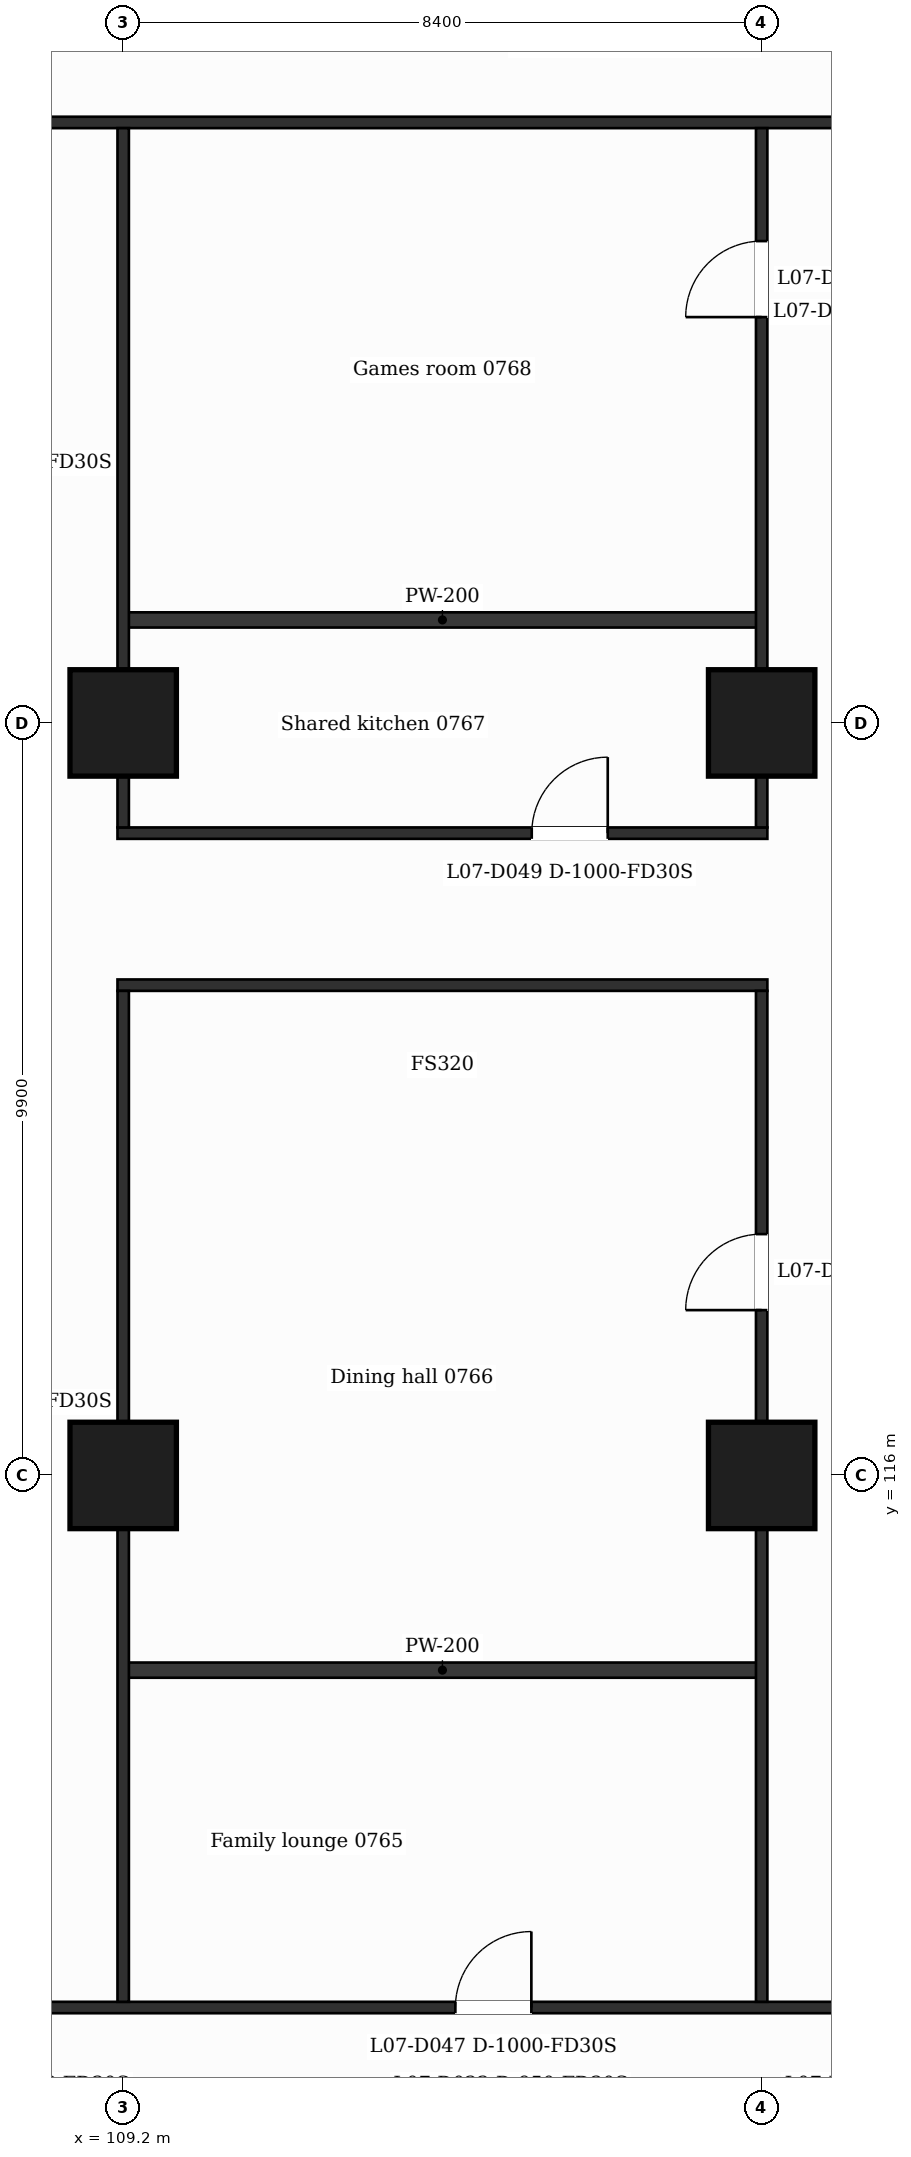
"""IFC4 building model, lengths in metres.
Left out: names, types, materials, properties, quantities, classifications, styles, units other than length and angle.
Written with IfcOpenShell. Run it as: python <this file> out.ifc"""

import sys

from ifc_helpers import new_model, si_unit, direction, frame, frame_2d, origin, origin_2d, place, context, subcontext, project, spatial, rectangle, extrude, element, fill, save


model = new_model("IFC4")
c1 = context("Model", 3, precision=1e-05, world=origin(), true_north=direction((0.0, 1.0)))
c2 = subcontext(c1, "Body", "Model", "MODEL_VIEW")
j1 = project(units=[si_unit("LENGTHUNIT", "METRE"), si_unit("PLANEANGLEUNIT", "RADIAN")], contexts=[c1])
p1 = place(None, origin())
s1 = spatial("IfcSite", under=j1, at=p1, CompositionType="ELEMENT")
p2 = place(p1, origin())
s2 = spatial("IfcBuilding", under=s1, at=p2, CompositionType="ELEMENT")
p3 = place(p2, frame((0.0, 0.0, 42.5)))
s3 = spatial("IfcBuildingStorey", under=s2, at=p3, CompositionType="ELEMENT", Elevation=42.5)
for number, where, z_axis, x_axis in (
    (1, (109.2, 116.0, 0.0), (0.0, 0.0, 1.0), (1.0, 0.0, 0.0)),
    (2, (117.6, 116.0, 0.0), (0.0, 0.0, 1.0), (1.0, 0.0, 0.0)),
    (3, (109.2, 125.9, 0.0), (0.0, 0.0, 1.0), (1.0, 0.0, 0.0)),
    (4, (117.6, 125.9, 0.0), (0.0, 0.0, 1.0), (1.0, 0.0, 0.0)),
):
    element("IfcColumn", number, at=place(p3, frame(where, z_axis=z_axis, x_axis=x_axis)), inside=s3, PredefinedType="COLUMN", context=c2, shape_type="SweptSolid", body=[
        extrude(rectangle(XDim=1.4, YDim=1.4, at=origin_2d()), origin(), (0.0, 0.0, 1.0), 3.5),
    ])
p4 = place(p3, frame((100.725, 109.0, 0.0), z_axis=(0.0, 0.0, 1.0), x_axis=(1.0, 0.0, 0.0)))
e5 = element("IfcWall", 5, at=p4, inside=s3, PredefinedType="PARTITIONING", context=c2, shape_type="SweptSolid", body=[
    extrude(rectangle(XDim=25.35, YDim=0.15, at=frame_2d((12.675, 0.0))), origin(), (0.0, 0.0, 1.0), 3.18),
])
p5 = place(p4, frame((1.2, 0.0, 0.0)))
e6 = element("IfcOpeningElement", 6, at=p5, cuts=e5, PredefinedType="OPENING", context=c2, shape_type="SweptSolid", body=[
    extrude(rectangle(XDim=1.0, YDim=2.1, at=frame_2d((0.5, 1.05))), frame((0.0, 0.085, 0.0), z_axis=(0.0, -1.0, 0.0), x_axis=(1.0, 0.0, 0.0)), (0.0, 0.0, 1.0), 0.17),
])
p6 = place(p4, frame((12.845, 0.0, 0.0)))
e7 = element("IfcOpeningElement", 7, at=p6, cuts=e5, PredefinedType="OPENING", context=c2, shape_type="SweptSolid", body=[
    extrude(rectangle(XDim=1.0, YDim=2.1, at=frame_2d((0.5, 1.05))), frame((0.0, 0.085, 0.0), z_axis=(0.0, -1.0, 0.0), x_axis=(1.0, 0.0, 0.0)), (0.0, 0.0, 1.0), 0.17),
])
p7 = place(p4, frame((23.15, 0.0, 0.0)))
e8 = element("IfcOpeningElement", 8, at=p7, cuts=e5, PredefinedType="OPENING", context=c2, shape_type="SweptSolid", body=[
    extrude(rectangle(XDim=1.0, YDim=2.1, at=frame_2d((0.5, 1.05))), frame((0.0, 0.085, 0.0), z_axis=(0.0, -1.0, 0.0), x_axis=(1.0, 0.0, 0.0)), (0.0, 0.0, 1.0), 0.17),
])
p8 = place(p3, frame((109.2, 113.438, 0.0), z_axis=(0.0, 0.0, 1.0), x_axis=(1.0, 0.0, 0.0)))
e9 = element("IfcWall", 9, at=p8, inside=s3, PredefinedType="PARTITIONING", context=c2, shape_type="SweptSolid", body=[
    extrude(rectangle(XDim=8.4, YDim=0.2, at=frame_2d((4.2, 0.0))), origin(), (0.0, 0.0, 1.0), 3.18),
])
p9 = place(p3, frame((109.125, 122.45, 0.0), z_axis=(0.0, 0.0, 1.0), x_axis=(1.0, 0.0, 0.0)))
e10 = element("IfcWall", 10, at=p9, inside=s3, PredefinedType="PARTITIONING", context=c2, shape_type="SweptSolid", body=[
    extrude(rectangle(XDim=8.55, YDim=0.15, at=frame_2d((4.275, 0.0))), origin(), (0.0, 0.0, 1.0), 3.18),
])
p10 = place(p3, frame((109.125, 124.45, 0.0), z_axis=(0.0, 0.0, 1.0), x_axis=(1.0, 0.0, 0.0)))
e11 = element("IfcWall", 11, at=p10, inside=s3, PredefinedType="PARTITIONING", context=c2, shape_type="SweptSolid", body=[
    extrude(rectangle(XDim=8.55, YDim=0.15, at=frame_2d((4.275, 0.0))), origin(), (0.0, 0.0, 1.0), 3.18),
])
p11 = place(p10, frame((5.45, 0.0, 0.0)))
e12 = element("IfcOpeningElement", 12, at=p11, cuts=e11, PredefinedType="OPENING", context=c2, shape_type="SweptSolid", body=[
    extrude(rectangle(XDim=1.0, YDim=2.1, at=frame_2d((0.5, 1.05))), frame((0.0, 0.085, 0.0), z_axis=(0.0, -1.0, 0.0), x_axis=(1.0, 0.0, 0.0)), (0.0, 0.0, 1.0), 0.17),
])
p12 = place(p3, frame((109.2, 127.255, 0.0), z_axis=(0.0, 0.0, 1.0), x_axis=(1.0, 0.0, 0.0)))
e13 = element("IfcWall", 13, at=p12, inside=s3, PredefinedType="PARTITIONING", context=c2, shape_type="SweptSolid", body=[
    extrude(rectangle(XDim=8.4, YDim=0.2, at=frame_2d((4.2, 0.0))), origin(), (0.0, 0.0, 1.0), 3.18),
])
p13 = place(p3, frame((100.725, 133.8, 0.0), z_axis=(0.0, 0.0, 1.0), x_axis=(1.0, 0.0, 0.0)))
e14 = element("IfcWall", 14, at=p13, inside=s3, PredefinedType="PARTITIONING", context=c2, shape_type="SweptSolid", body=[
    extrude(rectangle(XDim=25.35, YDim=0.15, at=frame_2d((12.675, 0.0))), origin(), (0.0, 0.0, 1.0), 3.18),
])
p14 = place(p3, frame((109.2, 109.075, 0.0), z_axis=(0.0, 0.0, 1.0), x_axis=(0.0, 1.0, 0.0)))
e15 = element("IfcWall", 15, at=p14, inside=s3, PredefinedType="PARTITIONING", context=c2, shape_type="SweptSolid", body=[
    extrude(rectangle(XDim=13.3, YDim=0.15, at=frame_2d((6.65, 0.0))), origin(), (0.0, 0.0, 1.0), 3.18),
])
p15 = place(p3, frame((109.2, 124.525, 0.0), z_axis=(0.0, 0.0, 1.0), x_axis=(0.0, 1.0, 0.0)))
e16 = element("IfcWall", 16, at=p15, inside=s3, PredefinedType="PARTITIONING", context=c2, shape_type="SweptSolid", body=[
    extrude(rectangle(XDim=9.2, YDim=0.15, at=frame_2d((4.6, 0.0))), origin(), (0.0, 0.0, 1.0), 3.18),
])
p16 = place(p3, frame((117.6, 109.075, 0.0), z_axis=(0.0, 0.0, 1.0), x_axis=(0.0, 1.0, 0.0)))
e17 = element("IfcWall", 17, at=p16, inside=s3, PredefinedType="PARTITIONING", context=c2, shape_type="SweptSolid", body=[
    extrude(rectangle(XDim=13.3, YDim=0.15, at=frame_2d((6.65, 0.0))), origin(), (0.0, 0.0, 1.0), 3.18),
])
p17 = place(p16, frame((9.1, 0.0, 0.0)))
e18 = element("IfcOpeningElement", 18, at=p17, cuts=e17, PredefinedType="OPENING", context=c2, shape_type="SweptSolid", body=[
    extrude(rectangle(XDim=1.0, YDim=2.1, at=frame_2d((0.5, 1.05))), frame((0.0, 0.085, 0.0), z_axis=(0.0, -1.0, 0.0), x_axis=(1.0, 0.0, 0.0)), (0.0, 0.0, 1.0), 0.17),
])
p18 = place(p3, frame((117.6, 124.525, 0.0), z_axis=(0.0, 0.0, 1.0), x_axis=(0.0, 1.0, 0.0)))
e19 = element("IfcWall", 19, at=p18, inside=s3, PredefinedType="PARTITIONING", context=c2, shape_type="SweptSolid", body=[
    extrude(rectangle(XDim=9.2, YDim=0.15, at=frame_2d((4.6, 0.0))), origin(), (0.0, 0.0, 1.0), 3.18),
])
p19 = place(p18, frame((6.714, 0.0, 0.0)))
e20 = element("IfcOpeningElement", 20, at=p19, cuts=e19, PredefinedType="OPENING", context=c2, shape_type="SweptSolid", body=[
    extrude(rectangle(XDim=1.0, YDim=2.1, at=frame_2d((0.5, 1.05))), frame((0.0, 0.085, 0.0), z_axis=(0.0, -1.0, 0.0), x_axis=(1.0, 0.0, 0.0)), (0.0, 0.0, 1.0), 0.17),
])
p20 = place(p6, origin())
e21 = element("IfcDoor", 21, at=p20, inside=s3, OperationType="SINGLE_SWING_RIGHT", PredefinedType="DOOR", context=c2, shape_type="SweptSolid", body=[
    extrude(rectangle(XDim=1.0, YDim=2.1, at=frame_2d((0.5, 1.05))), frame((0.0, 0.025, 0.0), z_axis=(0.0, -1.0, 0.0), x_axis=(1.0, 0.0, 0.0)), (0.0, 0.0, 1.0), 0.05),
])
fill(e7, e21)
p21 = place(p17, origin())
e22 = element("IfcDoor", 22, at=p21, inside=s3, OperationType="SINGLE_SWING_LEFT", PredefinedType="DOOR", context=c2, shape_type="SweptSolid", body=[
    extrude(rectangle(XDim=1.0, YDim=2.1, at=frame_2d((0.5, 1.05))), frame((0.0, 0.025, 0.0), z_axis=(0.0, -1.0, 0.0), x_axis=(1.0, 0.0, 0.0)), (0.0, 0.0, 1.0), 0.05),
])
fill(e18, e22)
p22 = place(p11, origin())
e23 = element("IfcDoor", 23, at=p22, inside=s3, OperationType="SINGLE_SWING_RIGHT", PredefinedType="DOOR", context=c2, shape_type="SweptSolid", body=[
    extrude(rectangle(XDim=1.0, YDim=2.1, at=frame_2d((0.5, 1.05))), frame((0.0, 0.025, 0.0), z_axis=(0.0, -1.0, 0.0), x_axis=(1.0, 0.0, 0.0)), (0.0, 0.0, 1.0), 0.05),
])
fill(e12, e23)
p23 = place(p19, origin())
e24 = element("IfcDoor", 24, at=p23, inside=s3, OperationType="SINGLE_SWING_LEFT", PredefinedType="DOOR", context=c2, shape_type="SweptSolid", body=[
    extrude(rectangle(XDim=1.0, YDim=2.1, at=frame_2d((0.5, 1.05))), frame((0.0, 0.025, 0.0), z_axis=(0.0, -1.0, 0.0), x_axis=(1.0, 0.0, 0.0)), (0.0, 0.0, 1.0), 0.05),
])
fill(e20, e24)
save(model, sys.argv[1])
